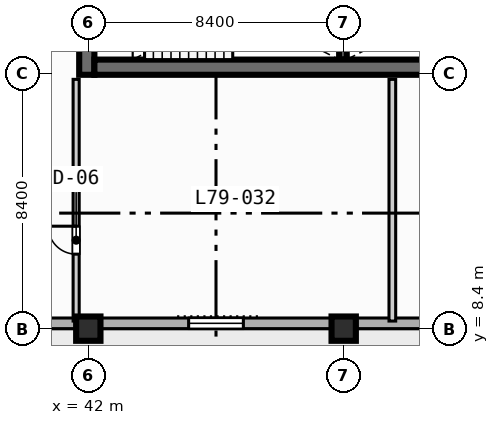
"""IFC4 building model, lengths in metres.
Left out: names, types, materials, properties, quantities, classifications, styles, units other than length and angle.
Written with IfcOpenShell. Run it as: python <this file> out.ifc"""

import sys

from ifc_helpers import new_model, si_unit, direction, frame, frame_2d, origin, origin_2d, place, context, subcontext, project, spatial, rectangle, extrude, element, fill, save


model = new_model("IFC4")
c1 = context("Model", 3, precision=1e-05, world=origin(), true_north=direction((0.0, 1.0)))
c2 = subcontext(c1, "Body", "Model", "MODEL_VIEW")
j1 = project(units=[si_unit("LENGTHUNIT", "METRE"), si_unit("PLANEANGLEUNIT", "RADIAN")], contexts=[c1])
p1 = place(None, origin())
s1 = spatial("IfcSite", under=j1, at=p1, CompositionType="ELEMENT")
p2 = place(p1, origin())
s2 = spatial("IfcBuilding", under=s1, at=p2, CompositionType="ELEMENT")
p3 = place(p2, frame((0.0, 0.0, 320.3)))
s3 = spatial("IfcBuildingStorey", under=s2, at=p3, CompositionType="ELEMENT", Elevation=320.3)
p4 = place(p3, frame((50.375, 17.25, 0.0), z_axis=(0.0, 0.0, 1.0), x_axis=(0.0, 1.0, 0.0)))
e1 = element("IfcWall", 1, at=p4, inside=s3, PredefinedType="SOLIDWALL", context=c2, shape_type="SweptSolid", body=[
    extrude(rectangle(XDim=3.5, YDim=0.25, at=frame_2d((1.75, 0.0))), origin(), (0.0, 0.0, 1.0), 3.67),
])
p5 = place(p3, frame((41.95, 16.75, 0.0), z_axis=(0.0, 0.0, 1.0), x_axis=(0.0, 1.0, 0.0)))
e2 = element("IfcWall", 2, at=p5, inside=s3, PredefinedType="SHEAR", context=c2, shape_type="SweptSolid", body=[
    extrude(rectangle(XDim=1.25, YDim=0.5, at=frame_2d((0.625, 0.0))), origin(), (0.0, 0.0, 1.0), 3.67),
])
p6 = place(p3, frame((42.2, 17.0, 0.0), z_axis=(0.0, 0.0, 1.0), x_axis=(1.0, 0.0, 0.0)))
e3 = element("IfcWall", 3, at=p6, inside=s3, PredefinedType="SHEAR", context=c2, shape_type="SweptSolid", body=[
    extrude(rectangle(XDim=16.35, YDim=0.5, at=frame_2d((8.175, 0.0))), origin(), (0.0, 0.0, 1.0), 3.67),
])
for number, where, z_axis, x_axis in (
    (4, (42.0, 8.4, 0.0), (0.0, 0.0, 1.0), (1.0, 0.0, 0.0)),
    (5, (50.4, 8.4, 0.0), (0.0, 0.0, 1.0), (1.0, 0.0, 0.0)),
):
    element("IfcColumn", number, at=place(p3, frame(where, z_axis=z_axis, x_axis=x_axis)), inside=s3, PredefinedType="COLUMN", context=c2, shape_type="SweptSolid", body=[
        extrude(rectangle(XDim=0.8, YDim=0.8, at=origin_2d()), origin(), (0.0, 0.0, 1.0), 3.9),
    ])
p7 = place(p3, frame((64.025, 8.575, 0.0), z_axis=(0.0, 0.0, 1.0), x_axis=(-1.0, 0.0, 0.0)))
e6 = element("IfcWall", 6, at=p7, inside=s3, PredefinedType="STANDARD", context=c2, shape_type="SweptSolid", body=[
    extrude(rectangle(XDim=52.45, YDim=0.35, at=frame_2d((26.225, 0.0))), origin(), (0.0, 0.0, 1.0), 3.67),
])
p8 = place(p7, frame((33.925, 0.0, 0.0)))
e7 = element("IfcOpeningElement", 7, at=p8, cuts=e6, PredefinedType="OPENING", context=c2, shape_type="SweptSolid", body=[
    extrude(rectangle(XDim=1.4, YDim=2.2, at=frame_2d((0.7, 1.1))), frame((0.0, 0.185, 0.0), z_axis=(0.0, -1.0, 0.0), x_axis=(1.0, 0.0, 0.0)), (0.0, 0.0, 1.0), 0.37),
])
p9 = place(p7, frame((41.825, 0.0, 0.85)))
e8 = element("IfcOpeningElement", 8, at=p9, cuts=e6, PredefinedType="OPENING", context=c2, shape_type="SweptSolid", body=[
    extrude(rectangle(XDim=2.4, YDim=1.95, at=frame_2d((1.2, 0.975))), frame((0.0, 0.185, 0.0), z_axis=(0.0, -1.0, 0.0), x_axis=(1.0, 0.0, 0.0)), (0.0, 0.0, 1.0), 0.37),
])
p10 = place(p7, frame((25.025, 0.0, 0.85)))
e9 = element("IfcOpeningElement", 9, at=p10, cuts=e6, PredefinedType="OPENING", context=c2, shape_type="SweptSolid", body=[
    extrude(rectangle(XDim=2.4, YDim=1.95, at=frame_2d((1.2, 0.975))), frame((0.0, 0.185, 0.0), z_axis=(0.0, -1.0, 0.0), x_axis=(1.0, 0.0, 0.0)), (0.0, 0.0, 1.0), 0.37),
])
p11 = place(p7, frame((16.925, 0.0, 0.85)))
e10 = element("IfcOpeningElement", 10, at=p11, cuts=e6, PredefinedType="OPENING", context=c2, shape_type="SweptSolid", body=[
    extrude(rectangle(XDim=1.8, YDim=1.8, at=frame_2d((0.9, 0.9))), frame((0.0, 0.185, 0.0), z_axis=(0.0, -1.0, 0.0), x_axis=(1.0, 0.0, 0.0)), (0.0, 0.0, 1.0), 0.37),
])
p12 = place(p7, frame((50.275, 0.0, 0.85)))
e11 = element("IfcOpeningElement", 11, at=p12, cuts=e6, PredefinedType="OPENING", context=c2, shape_type="SweptSolid", body=[
    extrude(rectangle(XDim=1.8, YDim=1.8, at=frame_2d((0.9, 0.9))), frame((0.0, 0.185, 0.0), z_axis=(0.0, -1.0, 0.0), x_axis=(1.0, 0.0, 0.0)), (0.0, 0.0, 1.0), 0.37),
])
p13 = place(p3, frame((41.6, 8.65, 0.0), z_axis=(0.0, 0.0, 1.0), x_axis=(0.0, 1.0, 0.0)))
e12 = element("IfcWall", 12, at=p13, inside=s3, PredefinedType="PARTITIONING", context=c2, shape_type="SweptSolid", body=[
    extrude(rectangle(XDim=7.95, YDim=0.2, at=frame_2d((3.975, 0.0))), origin(), (0.0, 0.0, 1.0), 3.67),
])
p14 = place(p13, frame((2.2, 0.0, 0.0)))
e13 = element("IfcOpeningElement", 13, at=p14, cuts=e12, PredefinedType="OPENING", context=c2, shape_type="SweptSolid", body=[
    extrude(rectangle(XDim=0.92, YDim=2.1, at=frame_2d((0.46, 1.05))), frame((0.0, 0.11, 0.0), z_axis=(0.0, -1.0, 0.0), x_axis=(1.0, 0.0, 0.0)), (0.0, 0.0, 1.0), 0.22),
])
p15 = place(p3, frame((52.0, 8.65, 0.0), z_axis=(0.0, 0.0, 1.0), x_axis=(0.0, 1.0, 0.0)))
e14 = element("IfcWall", 14, at=p15, inside=s3, PredefinedType="PARTITIONING", context=c2, shape_type="SweptSolid", body=[
    extrude(rectangle(XDim=7.95, YDim=0.22, at=frame_2d((3.975, 0.0))), origin(), (0.0, 0.0, 1.0), 3.67),
])
p16 = place(p11, origin())
e15 = element("IfcWindow", 15, at=p16, inside=s3, PartitioningType="SINGLE_PANEL", PredefinedType="WINDOW", context=c2, shape_type="SweptSolid", body=[
    extrude(rectangle(XDim=1.8, YDim=1.8, at=frame_2d((0.9, 0.9))), frame((0.0, 0.03, 0.0), z_axis=(0.0, -1.0, 0.0), x_axis=(1.0, 0.0, 0.0)), (0.0, 0.0, 1.0), 0.06),
])
fill(e10, e15)
p17 = place(p14, origin())
e16 = element("IfcDoor", 16, at=p17, inside=s3, OperationType="SINGLE_SWING_RIGHT", PredefinedType="DOOR", context=c2, shape_type="SweptSolid", body=[
    extrude(rectangle(XDim=0.92, YDim=2.1, at=frame_2d((0.46, 1.05))), frame((0.0, 0.025, 0.0), z_axis=(0.0, -1.0, 0.0), x_axis=(1.0, 0.0, 0.0)), (0.0, 0.0, 1.0), 0.05),
])
fill(e13, e16)
save(model, sys.argv[1])
